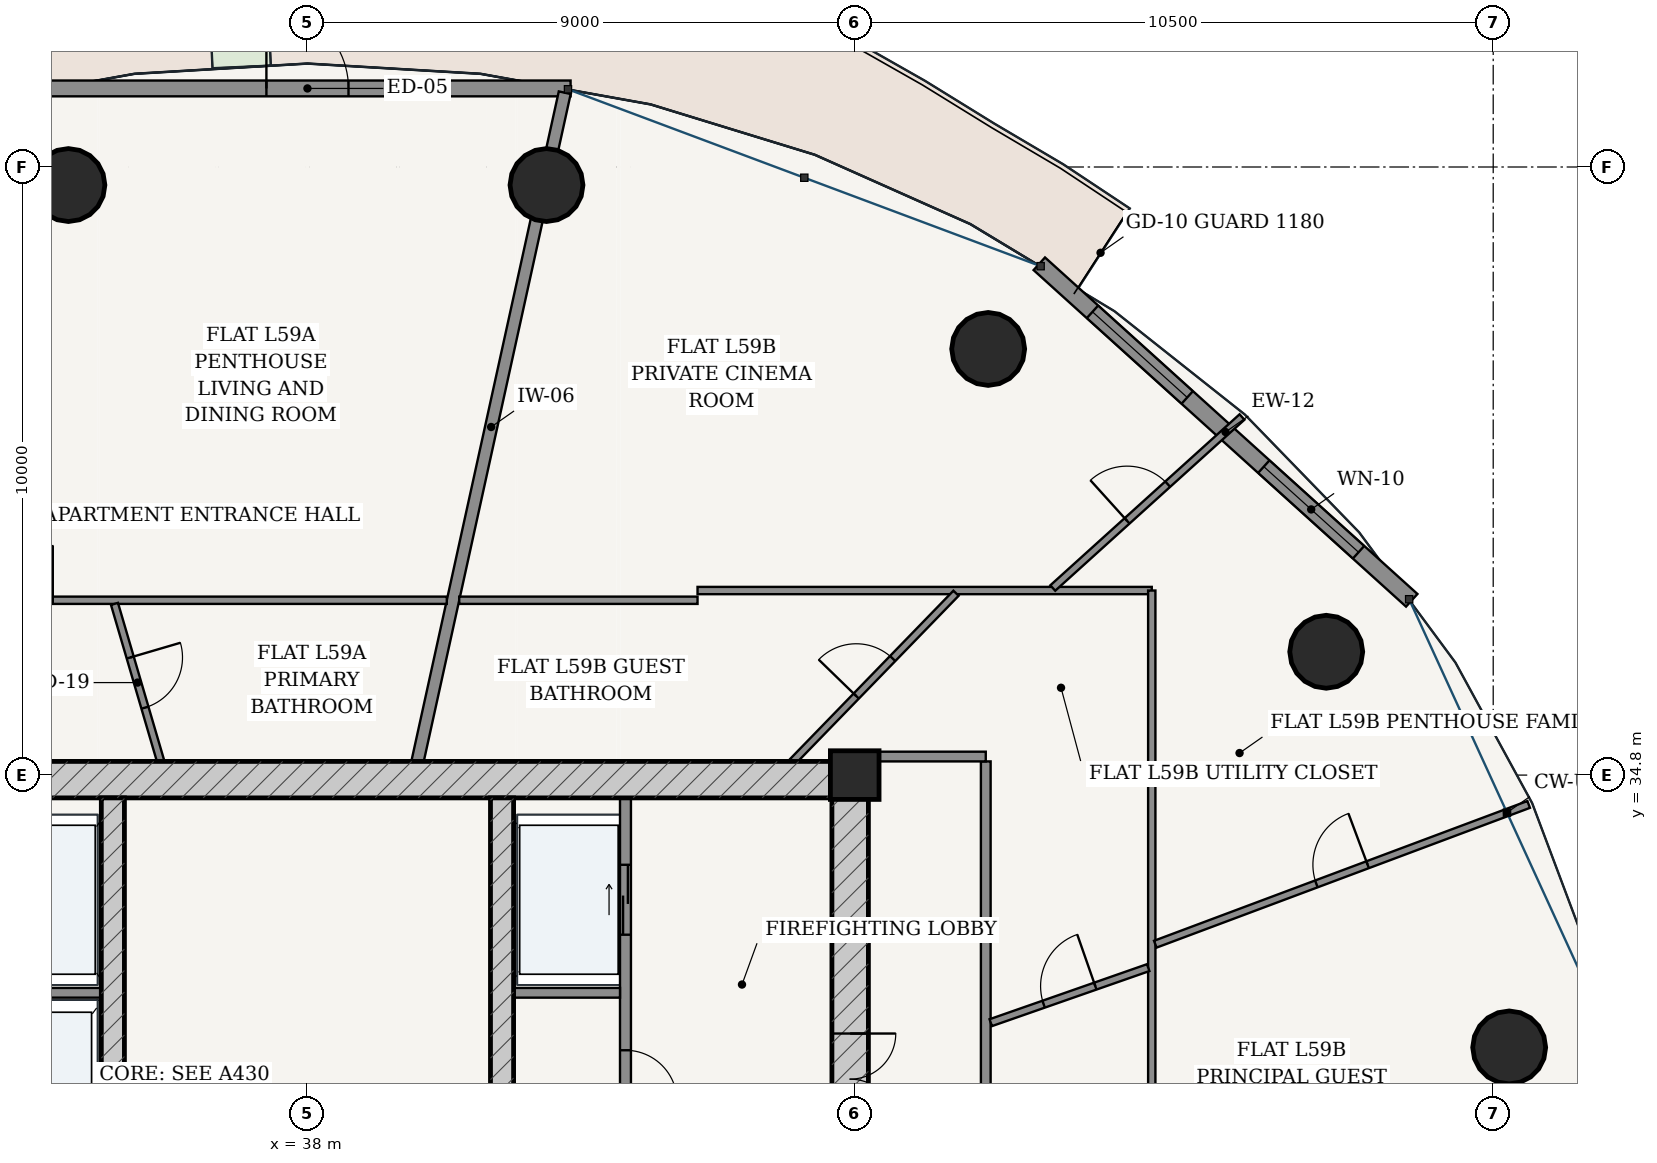
"""IFC4 building model, lengths in metres.
Left out: names, types, materials, properties, quantities, classifications, styles, units other than length and angle.
Written with IfcOpenShell. Run it as: python <this file> out.ifc"""

import sys

from ifc_helpers import new_model, si_unit, direction, frame, frame_2d, origin, origin_2d, place, context, subcontext, project, spatial, rectangle, hollow_circle, extrude, source, transform, mapped, element, fill, save


model = new_model("IFC4")
c1 = context("Model", 3, precision=1e-05, world=origin(), true_north=direction((-0.2419218956, 0.970295726276)))
c2 = subcontext(c1, "Body", "Model", "MODEL_VIEW")
j1 = project(units=[si_unit("LENGTHUNIT", "METRE"), si_unit("PLANEANGLEUNIT", "RADIAN")], contexts=[c1])
p1 = place(None, origin())
s1 = spatial("IfcSite", under=j1, at=p1, CompositionType="ELEMENT")
p2 = place(p1, origin())
s2 = spatial("IfcBuilding", under=s1, at=p2, CompositionType="ELEMENT")
p3 = place(p2, frame((0.0, 0.0, 224.5)))
s3 = spatial("IfcBuildingStorey", under=s2, at=p3, CompositionType="ELEMENT", Elevation=224.5)
p4 = place(p3, frame((47.0, 34.8, 0.0), z_axis=(0.0, 0.0, 1.0), x_axis=(1.0, 0.0, 0.0)))
e1 = element("IfcColumn", 1, at=p4, inside=s3, PredefinedType="COLUMN", context=c2, shape_type="SweptSolid", body=[
    extrude(rectangle(XDim=0.8, YDim=0.8, at=origin_2d()), origin(), (0.0, 0.0, 1.0), 3.7),
])
p5 = place(p3, frame((28.775, 34.725, 0.0), z_axis=(0.0, 0.0, 1.0), x_axis=(1.0, 0.0, 0.0)))
e2 = element("IfcWall", 2, at=p5, inside=s3, PredefinedType="SHEAR", context=c2, shape_type="SweptSolid", body=[
    extrude(rectangle(XDim=18.45, YDim=0.6, at=frame_2d((9.225, 0.0))), origin(), (0.0, 0.0, 1.0), 3.435),
])
p6 = place(p3, frame((46.925, 19.175, 0.0), z_axis=(0.0, 0.0, 1.0), x_axis=(0.0, 1.0, 0.0)))
e3 = element("IfcWall", 3, at=p6, inside=s3, PredefinedType="SHEAR", context=c2, shape_type="SweptSolid", body=[
    extrude(rectangle(XDim=15.25, YDim=0.6, at=frame_2d((7.625, 0.0))), origin(), (0.0, 0.0, 1.0), 3.435),
])
p7 = place(p6, frame((9.875, 0.0, 0.0)))
e4 = element("IfcOpeningElement", 4, at=p7, cuts=e3, PredefinedType="OPENING", context=c2, shape_type="SweptSolid", body=[
    extrude(rectangle(XDim=1.5, YDim=2.2, at=frame_2d((0.75, 1.1))), frame((0.0, 0.31, 0.0), z_axis=(0.0, -1.0, 0.0), x_axis=(1.0, 0.0, 0.0)), (0.0, 0.0, 1.0), 0.62),
])
p8 = place(p3, frame((34.8, 19.175, 0.0), z_axis=(0.0, 0.0, 1.0), x_axis=(0.0, 1.0, 0.0)))
e5 = element("IfcWall", 5, at=p8, inside=s3, PredefinedType="SHEAR", context=c2, shape_type="SweptSolid", body=[
    extrude(rectangle(XDim=15.25, YDim=0.38, at=frame_2d((7.625, 0.0))), origin(), (0.0, 0.0, 1.0), 3.435),
])
p9 = place(p8, frame((7.8, 0.0, 0.0)))
e6 = element("IfcOpeningElement", 6, at=p9, cuts=e5, PredefinedType="OPENING", context=c2, shape_type="SweptSolid", body=[
    extrude(rectangle(XDim=1.05, YDim=2.15, at=frame_2d((0.525, 1.075))), frame((0.0, 0.2, 0.0), z_axis=(0.0, -1.0, 0.0), x_axis=(1.0, 0.0, 0.0)), (0.0, 0.0, 1.0), 0.4),
])
p10 = place(p3, frame((41.2, 19.175, 0.0), z_axis=(0.0, 0.0, 1.0), x_axis=(0.0, 1.0, 0.0)))
e7 = element("IfcWall", 7, at=p10, inside=s3, PredefinedType="SHEAR", context=c2, shape_type="SweptSolid", body=[
    extrude(rectangle(XDim=15.25, YDim=0.38, at=frame_2d((7.625, 0.0))), origin(), (0.0, 0.0, 1.0), 3.435),
])
p11 = place(p10, frame((7.8, 0.0, 0.0)))
e8 = element("IfcOpeningElement", 8, at=p11, cuts=e7, PredefinedType="OPENING", context=c2, shape_type="SweptSolid", body=[
    extrude(rectangle(XDim=1.05, YDim=2.15, at=frame_2d((0.525, 1.075))), frame((0.0, 0.2, 0.0), z_axis=(0.0, -1.0, 0.0), x_axis=(1.0, 0.0, 0.0)), (0.0, 0.0, 1.0), 0.4),
])
for number, where, z_axis, x_axis in (
    (9, (57.763, 30.321, 0.0), (0.0, 0.0, 1.0), (1.0, 0.0, 0.0)),
    (10, (54.754, 36.828, 0.0), (0.0, 0.0, 1.0), (1.0, 0.0, 0.0)),
    (11, (49.195, 41.808, 0.0), (0.0, 0.0, 1.0), (1.0, 0.0, 0.0)),
    (12, (41.931, 44.503, 0.0), (0.0, 0.0, 1.0), (1.0, 0.0, 0.0)),
    (13, (34.069, 44.503, 0.0), (0.0, 0.0, 1.0), (1.0, 0.0, 0.0)),
):
    element("IfcColumn", number, at=place(p3, frame(where, z_axis=z_axis, x_axis=x_axis)), inside=s3, PredefinedType="COLUMN", context=c2, shape_type="SweptSolid", body=[
        extrude(hollow_circle(Radius=0.6, WallThickness=0.038, at=origin_2d()), origin(), (0.0, 0.0, 1.0), 3.7),
    ])
p12 = place(p3, frame((56.16, 37.674, 0.0), z_axis=(0.0, 0.0, 1.0), x_axis=(-0.741972126783, 0.670430729514, 0.0)))
e14 = element("IfcWall", 14, at=p12, inside=s3, PredefinedType="SOLIDWALL", context=c2, shape_type="SweptSolid", body=[
    extrude(rectangle(XDim=8.255, YDim=0.28, at=frame_2d((4.127, 0.0))), origin(), (0.0, 0.0, 1.0), 3.435),
])
p13 = place(p12, frame((1.179, 0.0, 0.85)))
e15 = element("IfcOpeningElement", 15, at=p13, cuts=e14, PredefinedType="OPENING", context=c2, shape_type="SweptSolid", body=[
    extrude(rectangle(XDim=2.1, YDim=1.95, at=frame_2d((1.05, 0.975))), frame((0.0, 0.15, 0.0), z_axis=(0.0, -1.0, 0.0), x_axis=(1.0, 0.0, 0.0)), (0.0, 0.0, 1.0), 0.3),
])
p14 = place(p12, frame((4.976, 0.0, 0.85)))
e16 = element("IfcOpeningElement", 16, at=p14, cuts=e14, PredefinedType="OPENING", context=c2, shape_type="SweptSolid", body=[
    extrude(rectangle(XDim=2.1, YDim=1.95, at=frame_2d((1.05, 0.975))), frame((0.0, 0.15, 0.0), z_axis=(0.0, -1.0, 0.0), x_axis=(1.0, 0.0, 0.0)), (0.0, 0.0, 1.0), 0.3),
])
p15 = place(p3, frame((42.327, 46.092, 0.0), z_axis=(0.0, 0.0, 1.0), x_axis=(-1.0, 0.0, 0.0)))
e17 = element("IfcWall", 17, at=p15, inside=s3, PredefinedType="SOLIDWALL", context=c2, shape_type="SweptSolid", body=[
    extrude(rectangle(XDim=8.654, YDim=0.26, at=frame_2d((4.327, 0.0))), origin(), (0.0, 0.0, 1.0), 3.435),
])
p16 = place(p15, frame((3.652, 0.0, 0.0)))
e18 = element("IfcOpeningElement", 18, at=p16, cuts=e17, PredefinedType="OPENING", context=c2, shape_type="SweptSolid", body=[
    extrude(rectangle(XDim=1.35, YDim=2.2, at=frame_2d((0.675, 1.1))), frame((0.0, 0.14, 0.0), z_axis=(0.0, -1.0, 0.0), x_axis=(1.0, 0.0, 0.0)), (0.0, 0.0, 1.0), 0.28),
])
p17 = place(p3, frame((32.86, 31.22, 0.0), z_axis=(0.0, 0.0, 1.0), x_axis=(1.0, 0.0, 0.0)))
e19 = element("IfcWall", 19, at=p17, inside=s3, PredefinedType="PARTITIONING", context=c2, shape_type="SweptSolid", body=[
    extrude(rectangle(XDim=1.75, YDim=0.16, at=frame_2d((0.875, 0.0))), origin(), (0.0, 0.0, 1.0), 3.435),
])
p18 = place(p3, frame((43.23, 28.52, 0.0), z_axis=(0.0, 0.0, 1.0), x_axis=(0.0, 1.0, 0.0)))
e20 = element("IfcWall", 20, at=p18, inside=s3, PredefinedType="PARTITIONING", context=c2, shape_type="SweptSolid", body=[
    extrude(rectangle(XDim=5.905, YDim=0.18, at=frame_2d((2.953, 0.0))), origin(), (0.0, 0.0, 1.0), 3.435),
])
p19 = place(p18, frame((0.905, 0.0, 0.0)))
e21 = element("IfcOpeningElement", 21, at=p19, cuts=e20, PredefinedType="OPENING", context=c2, shape_type="SweptSolid", body=[
    extrude(rectangle(XDim=0.85, YDim=2.1, at=frame_2d((0.425, 1.05))), frame((0.0, 0.1, 0.0), z_axis=(0.0, -1.0, 0.0), x_axis=(1.0, 0.0, 0.0)), (0.0, 0.0, 1.0), 0.2),
])
p20 = place(p18, frame((3.655, 0.0, 0.0)))
e22 = element("IfcOpeningElement", 22, at=p20, cuts=e20, PredefinedType="OPENING", context=c2, shape_type="SweptSolid", body=[
    extrude(rectangle(XDim=1.15, YDim=2.2, at=frame_2d((0.575, 1.1))), frame((0.0, 0.1, 0.0), z_axis=(0.0, -1.0, 0.0), x_axis=(1.0, 0.0, 0.0)), (0.0, 0.0, 1.0), 0.2),
])
p21 = place(p3, frame((41.39, 31.22, 0.0), z_axis=(0.0, 0.0, 1.0), x_axis=(1.0, 0.0, 0.0)))
e23 = element("IfcWall", 23, at=p21, inside=s3, PredefinedType="PARTITIONING", context=c2, shape_type="SweptSolid", body=[
    extrude(rectangle(XDim=1.75, YDim=0.16, at=frame_2d((0.875, 0.0))), origin(), (0.0, 0.0, 1.0), 3.435),
])
p22 = place(p3, frame((49.155, 16.725, 0.0), z_axis=(0.0, 0.0, 1.0), x_axis=(0.0, 1.0, 0.0)))
e24 = element("IfcWall", 24, at=p22, inside=s3, PredefinedType="PARTITIONING", context=c2, shape_type="SweptSolid", body=[
    extrude(rectangle(XDim=18.3, YDim=0.16, at=frame_2d((9.15, 0.0))), origin(), (0.0, 0.0, 1.0), 2.951),
])
p23 = place(p3, frame((47.225, 35.105, 0.0), z_axis=(0.0, 0.0, 1.0), x_axis=(1.0, 0.0, 0.0)))
e25 = element("IfcWall", 25, at=p23, inside=s3, PredefinedType="PARTITIONING", context=c2, shape_type="SweptSolid", body=[
    extrude(rectangle(XDim=1.93, YDim=0.16, at=frame_2d((0.965, 0.0))), origin(), (0.0, 0.0, 1.0), 3.435),
])
p24 = place(p3, frame((39.811, 35.027, 0.0), z_axis=(0.0, 0.0, 1.0), x_axis=(0.214966857327, 0.976621344356, 0.0)))
e26 = element("IfcWall", 26, at=p24, inside=s3, PredefinedType="PARTITIONING", context=c2, shape_type="SweptSolid", body=[
    extrude(rectangle(XDim=11.258, YDim=0.2, at=frame_2d((5.629, 0.0))), origin(), (0.0, 0.0, 1.0), 2.52),
])
p25 = place(p3, frame((31.585, 37.675, 0.0), z_axis=(0.0, 0.0, 1.0), x_axis=(1.0, 0.0, 0.0)))
e27 = element("IfcWall", 27, at=p25, inside=s3, PredefinedType="PARTITIONING", context=c2, shape_type="SweptSolid", body=[
    extrude(rectangle(XDim=8.707, YDim=0.12, at=frame_2d((4.354, 0.0))), origin(), (0.0, 0.0, 1.0), 2.951),
])
p26 = place(p25, frame((1.327, 0.0, 0.0)))
e28 = element("IfcOpeningElement", 28, at=p26, cuts=e27, PredefinedType="OPENING", context=c2, shape_type="SweptSolid", body=[
    extrude(rectangle(XDim=0.9, YDim=2.15, at=frame_2d((0.45, 1.075))), frame((0.0, 0.07, 0.0), z_axis=(0.0, -1.0, 0.0), x_axis=(1.0, 0.0, 0.0)), (0.0, 0.0, 1.0), 0.14),
])
p27 = place(p3, frame((35.586, 35.027, 0.0), z_axis=(0.0, 0.0, 1.0), x_axis=(-0.281539118681, 0.959549751004, 0.0)))
e29 = element("IfcWall", 29, at=p27, inside=s3, PredefinedType="PARTITIONING", context=c2, shape_type="SweptSolid", body=[
    extrude(rectangle(XDim=2.698, YDim=0.12, at=frame_2d((1.349, 0.0))), origin(), (0.0, 0.0, 1.0), 2.52),
])
p28 = place(p27, frame((0.919, 0.0, 0.0)))
e30 = element("IfcOpeningElement", 30, at=p28, cuts=e29, PredefinedType="OPENING", context=c2, shape_type="SweptSolid", body=[
    extrude(rectangle(XDim=0.86, YDim=2.15, at=frame_2d((0.43, 1.075))), frame((0.0, 0.07, 0.0), z_axis=(0.0, -1.0, 0.0), x_axis=(1.0, 0.0, 0.0)), (0.0, 0.0, 1.0), 0.14),
])
p29 = place(p3, frame((40.496, 37.675, 0.0), z_axis=(0.0, 0.0, 1.0), x_axis=(1.0, 0.0, 0.0)))
e31 = element("IfcWall", 31, at=p29, inside=s3, PredefinedType="PARTITIONING", context=c2, shape_type="SweptSolid", body=[
    extrude(rectangle(XDim=3.919, YDim=0.12, at=frame_2d((1.959, 0.0))), origin(), (0.0, 0.0, 1.0), 2.951),
])
p30 = place(p3, frame((44.415, 37.835, 0.0), z_axis=(0.0, 0.0, 1.0), x_axis=(1.0, 0.0, 0.0)))
e32 = element("IfcWall", 32, at=p30, inside=s3, PredefinedType="PARTITIONING", context=c2, shape_type="SweptSolid", body=[
    extrude(rectangle(XDim=7.47, YDim=0.12, at=frame_2d((3.735, 0.0))), origin(), (0.0, 0.0, 1.0), 2.951),
])
p31 = place(p3, frame((51.885, 37.835, 0.0), z_axis=(0.0, 0.0, 1.0), x_axis=(0.0, -1.0, 0.0)))
e33 = element("IfcWall", 33, at=p31, inside=s3, PredefinedType="PARTITIONING", context=c2, shape_type="SweptSolid", body=[
    extrude(rectangle(XDim=23.92, YDim=0.12, at=frame_2d((11.96, 0.0))), origin(), (0.0, 0.0, 1.0), 2.951),
])
p32 = place(p31, frame((16.558, 0.0, 0.0)))
e34 = element("IfcOpeningElement", 34, at=p32, cuts=e33, PredefinedType="OPENING", context=c2, shape_type="SweptSolid", body=[
    extrude(rectangle(XDim=0.9, YDim=2.15, at=frame_2d((0.45, 1.075))), frame((0.0, 0.07, 0.0), z_axis=(0.0, -1.0, 0.0), x_axis=(1.0, 0.0, 0.0)), (0.0, 0.0, 1.0), 0.14),
])
p33 = place(p3, frame((51.943, 32.019, 0.0), z_axis=(0.0, 0.0, 1.0), x_axis=(0.936540194592, 0.350560214389, 0.0)))
e35 = element("IfcWall", 35, at=p33, inside=s3, PredefinedType="PARTITIONING", context=c2, shape_type="SweptSolid", body=[
    extrude(rectangle(XDim=6.556, YDim=0.12, at=frame_2d((3.278, 0.0))), origin(), (0.0, 0.0, 1.0), 2.951),
])
p34 = place(p33, frame((2.828, 0.0, 0.0)))
e36 = element("IfcOpeningElement", 36, at=p34, cuts=e35, PredefinedType="OPENING", context=c2, shape_type="SweptSolid", body=[
    extrude(rectangle(XDim=0.9, YDim=2.15, at=frame_2d((0.45, 1.075))), frame((0.0, 0.07, 0.0), z_axis=(0.0, -1.0, 0.0), x_axis=(1.0, 0.0, 0.0)), (0.0, 0.0, 1.0), 0.14),
])
p35 = place(p3, frame((50.257, 37.876, 0.0), z_axis=(0.0, 0.0, 1.0), x_axis=(0.741943837234, 0.670462036502, 0.0)))
e37 = element("IfcWall", 37, at=p35, inside=s3, PredefinedType="PARTITIONING", context=c2, shape_type="SweptSolid", body=[
    extrude(rectangle(XDim=4.194, YDim=0.12, at=frame_2d((2.097, 0.0))), origin(), (0.0, 0.0, 1.0), 2.951),
])
p36 = place(p35, frame((1.647, 0.0, 0.0)))
e38 = element("IfcOpeningElement", 38, at=p36, cuts=e37, PredefinedType="OPENING", context=c2, shape_type="SweptSolid", body=[
    extrude(rectangle(XDim=0.9, YDim=2.15, at=frame_2d((0.45, 1.075))), frame((0.0, 0.07, 0.0), z_axis=(0.0, -1.0, 0.0), x_axis=(1.0, 0.0, 0.0)), (0.0, 0.0, 1.0), 0.14),
])
p37 = place(p3, frame((49.237, 30.729, 0.0), z_axis=(0.0, 0.0, 1.0), x_axis=(0.94398177501, 0.329997588549, 0.0)))
e39 = element("IfcWall", 39, at=p37, inside=s3, PredefinedType="PARTITIONING", context=c2, shape_type="SweptSolid", body=[
    extrude(rectangle(XDim=2.743, YDim=0.12, at=frame_2d((1.372, 0.0))), origin(), (0.0, 0.0, 1.0), 3.11),
])
p38 = place(p37, frame((0.922, 0.0, 0.0)))
e40 = element("IfcOpeningElement", 40, at=p38, cuts=e39, PredefinedType="OPENING", context=c2, shape_type="SweptSolid", body=[
    extrude(rectangle(XDim=0.9, YDim=2.15, at=frame_2d((0.45, 1.075))), frame((0.0, 0.07, 0.0), z_axis=(0.0, -1.0, 0.0), x_axis=(1.0, 0.0, 0.0)), (0.0, 0.0, 1.0), 0.14),
])
p39 = place(p3, frame((45.983, 35.026, 0.0), z_axis=(0.0, 0.0, 1.0), x_axis=(0.696410097703, 0.717644045344, 0.0)))
e41 = element("IfcWall", 41, at=p39, inside=s3, PredefinedType="PARTITIONING", context=c2, shape_type="SweptSolid", body=[
    extrude(rectangle(XDim=3.852, YDim=0.12, at=frame_2d((1.926, 0.0))), origin(), (0.0, 0.0, 1.0), 2.951),
])
p40 = place(p39, frame((1.496, 0.0, 0.0)))
e42 = element("IfcOpeningElement", 42, at=p40, cuts=e41, PredefinedType="OPENING", context=c2, shape_type="SweptSolid", body=[
    extrude(rectangle(XDim=0.86, YDim=2.15, at=frame_2d((0.43, 1.075))), frame((0.0, 0.07, 0.0), z_axis=(0.0, -1.0, 0.0), x_axis=(1.0, 0.0, 0.0)), (0.0, 0.0, 1.0), 0.14),
])
m1 = source(origin(), c2, "Body", "SweptSolid", [
    extrude(rectangle(XDim=2.1, YDim=1.95, at=frame_2d((1.05, 0.975))), frame((0.0, 0.03, 0.0), z_axis=(0.0, -1.0, 0.0), x_axis=(1.0, 0.0, 0.0)), (0.0, 0.0, 1.0), 0.06),
])
p41 = place(p13, origin())
e43 = element("IfcWindow", 43, at=p41, inside=s3, PartitioningType="SINGLE_PANEL", PredefinedType="WINDOW", context=c2, shape_type="MappedRepresentation", body=[
    mapped(m1, transform((0.0, 0.0, 0.0), scale=1.0)),
])
fill(e15, e43)
p42 = place(p14, origin())
e44 = element("IfcWindow", 44, at=p42, inside=s3, PartitioningType="SINGLE_PANEL", PredefinedType="WINDOW", context=c2, shape_type="MappedRepresentation", body=[
    mapped(m1, transform((0.0, 0.0, 0.0), scale=1.0)),
])
fill(e16, e44)
m2 = source(origin(), c2, "Body", "SweptSolid", [
    extrude(rectangle(XDim=1.35, YDim=2.2, at=frame_2d((0.675, 1.1))), frame((0.0, 0.025, 0.0), z_axis=(0.0, -1.0, 0.0), x_axis=(1.0, 0.0, 0.0)), (0.0, 0.0, 1.0), 0.05),
])
p43 = place(p16, frame((1.35, 0.0, 0.0), z_axis=(0.0, 0.0, 1.0), x_axis=(-1.0, 0.0, 0.0)))
e45 = element("IfcDoor", 45, at=p43, inside=s3, OperationType="SINGLE_SWING_LEFT", PredefinedType="DOOR", context=c2, shape_type="MappedRepresentation", body=[
    mapped(m2, transform((0.0, 0.0, 0.0), scale=1.0)),
])
fill(e18, e45)
m3 = source(origin(), c2, "Body", "SweptSolid", [
    extrude(rectangle(XDim=1.5, YDim=2.2, at=frame_2d((0.75, 1.1))), frame((0.0, 0.025, 0.0), z_axis=(0.0, -1.0, 0.0), x_axis=(1.0, 0.0, 0.0)), (0.0, 0.0, 1.0), 0.05),
])
p44 = place(p7, frame((1.5, 0.0, 0.0), z_axis=(0.0, 0.0, 1.0), x_axis=(-1.0, 0.0, 0.0)))
e46 = element("IfcDoor", 46, at=p44, inside=s3, OperationType="DOUBLE_DOOR_SINGLE_SWING", PredefinedType="DOOR", context=c2, shape_type="MappedRepresentation", body=[
    mapped(m3, transform((0.0, 0.0, 0.0), scale=1.0)),
])
fill(e4, e46)
m4 = source(origin(), c2, "Body", "SweptSolid", [
    extrude(rectangle(XDim=0.85, YDim=2.1, at=frame_2d((0.425, 1.05))), frame((0.0, 0.025, 0.0), z_axis=(0.0, -1.0, 0.0), x_axis=(1.0, 0.0, 0.0)), (0.0, 0.0, 1.0), 0.05),
])
p45 = place(p19, frame((0.85, 0.0, 0.0), z_axis=(0.0, 0.0, 1.0), x_axis=(-1.0, 0.0, 0.0)))
e47 = element("IfcDoor", 47, at=p45, inside=s3, OperationType="SINGLE_SWING_RIGHT", PredefinedType="DOOR", context=c2, shape_type="MappedRepresentation", body=[
    mapped(m4, transform((0.0, 0.0, 0.0), scale=1.0)),
])
fill(e21, e47)
m5 = source(origin(), c2, "Body", "SweptSolid", [
    extrude(rectangle(XDim=1.15, YDim=2.2, at=frame_2d((0.575, 1.1))), frame((0.0, 0.025, 0.0), z_axis=(0.0, -1.0, 0.0), x_axis=(1.0, 0.0, 0.0)), (0.0, 0.0, 1.0), 0.05),
])
p46 = place(p20, origin())
e48 = element("IfcDoor", 48, at=p46, inside=s3, OperationType="DOUBLE_DOOR_SLIDING", PredefinedType="DOOR", context=c2, shape_type="MappedRepresentation", body=[
    mapped(m5, transform((0.0, 0.0, 0.0), scale=1.0)),
])
fill(e22, e48)
m6 = source(origin(), c2, "Body", "SweptSolid", [
    extrude(rectangle(XDim=0.86, YDim=2.15, at=frame_2d((0.43, 1.075))), frame((0.0, 0.025, 0.0), z_axis=(0.0, -1.0, 0.0), x_axis=(1.0, 0.0, 0.0)), (0.0, 0.0, 1.0), 0.05),
])
p47 = place(p28, frame((0.86, 0.0, 0.0), z_axis=(0.0, 0.0, 1.0), x_axis=(-1.0, 0.0, 0.0)))
e49 = element("IfcDoor", 49, at=p47, inside=s3, OperationType="SINGLE_SWING_LEFT", PredefinedType="DOOR", context=c2, shape_type="MappedRepresentation", body=[
    mapped(m6, transform((0.0, 0.0, 0.0), scale=1.0)),
])
fill(e30, e49)
m7 = source(origin(), c2, "Body", "SweptSolid", [
    extrude(rectangle(XDim=0.9, YDim=2.15, at=frame_2d((0.45, 1.075))), frame((0.0, 0.025, 0.0), z_axis=(0.0, -1.0, 0.0), x_axis=(1.0, 0.0, 0.0)), (0.0, 0.0, 1.0), 0.05),
])
p48 = place(p26, origin())
e50 = element("IfcDoor", 50, at=p48, inside=s3, OperationType="SINGLE_SWING_RIGHT", PredefinedType="DOOR", context=c2, shape_type="MappedRepresentation", body=[
    mapped(m7, transform((0.0, 0.0, 0.0), scale=1.0)),
])
fill(e28, e50)
p49 = place(p38, origin())
e51 = element("IfcDoor", 51, at=p49, inside=s3, OperationType="SINGLE_SWING_RIGHT", PredefinedType="DOOR", context=c2, shape_type="MappedRepresentation", body=[
    mapped(m7, transform((0.0, 0.0, 0.0), scale=1.0)),
])
fill(e40, e51)
p50 = place(p40, origin())
e52 = element("IfcDoor", 52, at=p50, inside=s3, OperationType="SINGLE_SWING_LEFT", PredefinedType="DOOR", context=c2, shape_type="MappedRepresentation", body=[
    mapped(m6, transform((0.0, 0.0, 0.0), scale=1.0)),
])
fill(e42, e52)
p51 = place(p34, origin())
e53 = element("IfcDoor", 53, at=p51, inside=s3, OperationType="SINGLE_SWING_RIGHT", PredefinedType="DOOR", context=c2, shape_type="MappedRepresentation", body=[
    mapped(m7, transform((0.0, 0.0, 0.0), scale=1.0)),
])
fill(e36, e53)
p52 = place(p36, origin())
e54 = element("IfcDoor", 54, at=p52, inside=s3, OperationType="SINGLE_SWING_LEFT", PredefinedType="DOOR", context=c2, shape_type="MappedRepresentation", body=[
    mapped(m7, transform((0.0, 0.0, 0.0), scale=1.0)),
])
fill(e38, e54)
save(model, sys.argv[1])
